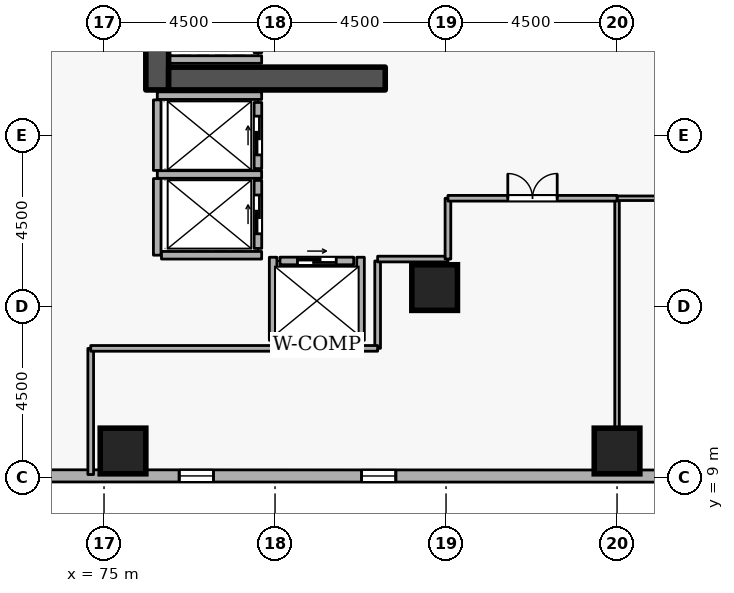
"""IFC4 building model, lengths in metres.
Left out: names, types, materials, properties, quantities, classifications, styles, units other than length and angle.
Written with IfcOpenShell. Run it as: python <this file> out.ifc"""

import sys

from ifc_helpers import new_model, si_unit, direction, frame, frame_2d, origin, origin_2d, place, context, subcontext, project, spatial, rectangle, extrude, element, fill, save


model = new_model("IFC4")
c1 = context("Model", 3, precision=1e-05, world=origin(), true_north=direction((0.0, 1.0)))
c2 = subcontext(c1, "Body", "Model", "MODEL_VIEW")
j1 = project(units=[si_unit("LENGTHUNIT", "METRE"), si_unit("PLANEANGLEUNIT", "RADIAN")], contexts=[c1])
p1 = place(None, origin())
s1 = spatial("IfcSite", under=j1, at=p1, CompositionType="ELEMENT")
p2 = place(p1, origin())
s2 = spatial("IfcBuilding", under=s1, at=p2, CompositionType="ELEMENT")
p3 = place(p2, frame((0.0, 0.0, 80.1)))
s3 = spatial("IfcBuildingStorey", under=s2, at=p3, CompositionType="ELEMENT", Elevation=80.1)
p4 = place(p3, frame((76.4, 19.2, 0.0), z_axis=(0.0, 0.0, 1.0), x_axis=(0.0, 1.0, 0.0)))
e1 = element("IfcWall", 1, at=p4, inside=s3, PredefinedType="SHEAR", context=c2, shape_type="SweptSolid", body=[
    extrude(rectangle(XDim=15.6, YDim=0.6, at=frame_2d((7.8, 0.0))), origin(), (0.0, 0.0, 1.0), 3.6),
])
p5 = place(p3, frame((76.7, 19.5, 0.0), z_axis=(0.0, 0.0, 1.0), x_axis=(1.0, 0.0, 0.0)))
e2 = element("IfcWall", 2, at=p5, inside=s3, PredefinedType="SHEAR", context=c2, shape_type="SweptSolid", body=[
    extrude(rectangle(XDim=5.7, YDim=0.6, at=frame_2d((2.85, 0.0))), origin(), (0.0, 0.0, 1.0), 3.6),
])
for number, where, z_axis, x_axis in (
    (3, (88.5, 9.7, 0.0), (0.0, 0.0, 1.0), (1.0, 0.0, 0.0)),
    (4, (75.5, 9.7, 0.0), (0.0, 0.0, 1.0), (1.0, 0.0, 0.0)),
    (5, (83.7, 14.0, 0.0), (0.0, 0.0, 1.0), (1.0, 0.0, 0.0)),
):
    element("IfcColumn", number, at=place(p3, frame(where, z_axis=z_axis, x_axis=x_axis)), inside=s3, PredefinedType="COLUMN", context=c2, shape_type="SweptSolid", body=[
        extrude(rectangle(XDim=1.2, YDim=1.2, at=origin_2d()), origin(), (0.0, 0.0, 1.0), 3.6),
    ])
p6 = place(p3, frame((70.378, 9.046, 0.0), z_axis=(0.0, 0.0, 1.0), x_axis=(0.999999950907, -0.000313347115, 0.0)))
e6 = element("IfcWall", 6, at=p6, inside=s3, PredefinedType="STANDARD", context=c2, shape_type="SweptSolid", body=[
    extrude(rectangle(XDim=33.503, YDim=0.32, at=frame_2d((16.751, 0.0))), origin(), (0.0, 0.0, 1.0), 2.7),
])
p7 = place(p6, frame((6.6, 0.0, 0.72)))
e7 = element("IfcOpeningElement", 7, at=p7, cuts=e6, PredefinedType="OPENING", context=c2, shape_type="SweptSolid", body=[
    extrude(rectangle(XDim=0.9, YDim=1.75, at=frame_2d((0.45, 0.875))), frame((0.0, 0.17, 0.0), z_axis=(0.0, -1.0, 0.0), x_axis=(1.0, 0.0, 0.0)), (0.0, 0.0, 1.0), 0.34),
])
p8 = place(p6, frame((11.4, 0.0, 0.72)))
e8 = element("IfcOpeningElement", 8, at=p8, cuts=e6, PredefinedType="OPENING", context=c2, shape_type="SweptSolid", body=[
    extrude(rectangle(XDim=0.9, YDim=1.75, at=frame_2d((0.45, 0.875))), frame((0.0, 0.17, 0.0), z_axis=(0.0, -1.0, 0.0), x_axis=(1.0, 0.0, 0.0)), (0.0, 0.0, 1.0), 0.34),
])
p9 = place(p6, frame((21.0, 0.0, 0.72)))
e9 = element("IfcOpeningElement", 9, at=p9, cuts=e6, PredefinedType="OPENING", context=c2, shape_type="SweptSolid", body=[
    extrude(rectangle(XDim=0.9, YDim=1.75, at=frame_2d((0.45, 0.875))), frame((0.0, 0.17, 0.0), z_axis=(0.0, -1.0, 0.0), x_axis=(1.0, 0.0, 0.0)), (0.0, 0.0, 1.0), 0.34),
])
p10 = place(p6, frame((25.8, 0.0, 0.72)))
e10 = element("IfcOpeningElement", 10, at=p10, cuts=e6, PredefinedType="OPENING", context=c2, shape_type="SweptSolid", body=[
    extrude(rectangle(XDim=0.9, YDim=1.75, at=frame_2d((0.45, 0.875))), frame((0.0, 0.17, 0.0), z_axis=(0.0, -1.0, 0.0), x_axis=(1.0, 0.0, 0.0)), (0.0, 0.0, 1.0), 0.34),
])
p11 = place(p3, frame((79.05, 20.18, 0.0), z_axis=(0.0, 0.0, 1.0), x_axis=(0.0, 1.0, 0.0)))
e11 = element("IfcWall", 11, at=p11, inside=s3, PredefinedType="STANDARD", context=c2, shape_type="SweptSolid", body=[
    extrude(rectangle(XDim=1.94, YDim=0.2, at=frame_2d((0.97, 0.0))), origin(), (0.0, 0.0, 1.0), 3.34),
])
p12 = place(p3, frame((79.05, 17.13, 0.0), z_axis=(0.0, 0.0, 1.0), x_axis=(0.0, 1.0, 0.0)))
e12 = element("IfcWall", 12, at=p12, inside=s3, PredefinedType="STANDARD", context=c2, shape_type="SweptSolid", body=[
    extrude(rectangle(XDim=1.74, YDim=0.2, at=frame_2d((0.87, 0.0))), origin(), (0.0, 0.0, 1.0), 3.34),
])
p13 = place(p12, frame((0.36, 0.0, 0.0)))
e13 = element("IfcOpeningElement", 13, at=p13, cuts=e12, PredefinedType="OPENING", context=c2, shape_type="SweptSolid", body=[
    extrude(rectangle(XDim=1.02, YDim=2.06, at=frame_2d((0.51, 1.03))), frame((0.0, 0.11, 0.0), z_axis=(0.0, -1.0, 0.0), x_axis=(1.0, 0.0, 0.0)), (0.0, 0.0, 1.0), 0.22),
])
p14 = place(p3, frame((79.05, 15.03, 0.0), z_axis=(0.0, 0.0, 1.0), x_axis=(0.0, 1.0, 0.0)))
e14 = element("IfcWall", 14, at=p14, inside=s3, PredefinedType="STANDARD", context=c2, shape_type="SweptSolid", body=[
    extrude(rectangle(XDim=1.79, YDim=0.2, at=frame_2d((0.895, 0.0))), origin(), (0.0, 0.0, 1.0), 3.34),
])
p15 = place(p14, frame((0.385, 0.0, 0.0)))
e15 = element("IfcOpeningElement", 15, at=p15, cuts=e14, PredefinedType="OPENING", context=c2, shape_type="SweptSolid", body=[
    extrude(rectangle(XDim=1.02, YDim=2.06, at=frame_2d((0.51, 1.03))), frame((0.0, 0.11, 0.0), z_axis=(0.0, -1.0, 0.0), x_axis=(1.0, 0.0, 0.0)), (0.0, 0.0, 1.0), 0.22),
])
p16 = place(p3, frame((79.63, 14.7, 0.0), z_axis=(0.0, 0.0, 1.0), x_axis=(1.0, 0.0, 0.0)))
e16 = element("IfcWall", 16, at=p16, inside=s3, PredefinedType="STANDARD", context=c2, shape_type="SweptSolid", body=[
    extrude(rectangle(XDim=1.94, YDim=0.2, at=frame_2d((0.97, 0.0))), origin(), (0.0, 0.0, 1.0), 3.34),
])
p17 = place(p16, frame((0.46, 0.0, 0.0)))
e17 = element("IfcOpeningElement", 17, at=p17, cuts=e16, PredefinedType="OPENING", context=c2, shape_type="SweptSolid", body=[
    extrude(rectangle(XDim=1.02, YDim=2.06, at=frame_2d((0.51, 1.03))), frame((0.0, 0.11, 0.0), z_axis=(0.0, -1.0, 0.0), x_axis=(1.0, 0.0, 0.0)), (0.0, 0.0, 1.0), 0.22),
])
p18 = place(p3, frame((76.712, 20.0, 0.0), z_axis=(0.0, 0.0, 1.0), x_axis=(1.0, 0.0, 0.0)))
e18 = element("IfcWall", 18, at=p18, inside=s3, PredefinedType="STANDARD", context=c2, shape_type="SweptSolid", body=[
    extrude(rectangle(XDim=2.436, YDim=0.2, at=frame_2d((1.218, 0.0))), origin(), (0.0, 0.0, 1.0), 3.34),
])
p19 = place(p3, frame((76.402, 19.05, 0.0), z_axis=(0.0, 0.0, 1.0), x_axis=(1.0, 0.0, 0.0)))
e19 = element("IfcWall", 19, at=p19, inside=s3, PredefinedType="STANDARD", context=c2, shape_type="SweptSolid", body=[
    extrude(rectangle(XDim=2.746, YDim=0.2, at=frame_2d((1.373, 0.0))), origin(), (0.0, 0.0, 1.0), 2.545),
])
p20 = place(p3, frame((76.402, 16.975, 0.0), z_axis=(0.0, 0.0, 1.0), x_axis=(1.0, 0.0, 0.0)))
e20 = element("IfcWall", 20, at=p20, inside=s3, PredefinedType="STANDARD", context=c2, shape_type="SweptSolid", body=[
    extrude(rectangle(XDim=2.746, YDim=0.2, at=frame_2d((1.373, 0.0))), origin(), (0.0, 0.0, 1.0), 3.34),
])
p21 = place(p3, frame((76.4, 14.852, 0.0), z_axis=(0.0, 0.0, 1.0), x_axis=(0.0, 1.0, 0.0)))
e21 = element("IfcWall", 21, at=p21, inside=s3, PredefinedType="STANDARD", context=c2, shape_type="SweptSolid", body=[
    extrude(rectangle(XDim=2.016, YDim=0.2, at=frame_2d((1.008, 0.0))), origin(), (0.0, 0.0, 1.0), 3.34),
])
p22 = place(p3, frame((76.4, 17.082, 0.0), z_axis=(0.0, 0.0, 1.0), x_axis=(0.0, 1.0, 0.0)))
e22 = element("IfcWall", 22, at=p22, inside=s3, PredefinedType="STANDARD", context=c2, shape_type="SweptSolid", body=[
    extrude(rectangle(XDim=1.856, YDim=0.2, at=frame_2d((0.928, 0.0))), origin(), (0.0, 0.0, 1.0), 3.34),
])
p23 = place(p3, frame((76.512, 14.85, 0.0), z_axis=(0.0, 0.0, 1.0), x_axis=(1.0, 0.0, 0.0)))
e23 = element("IfcWall", 23, at=p23, inside=s3, PredefinedType="STANDARD", context=c2, shape_type="SweptSolid", body=[
    extrude(rectangle(XDim=2.636, YDim=0.2, at=frame_2d((1.318, 0.0))), origin(), (0.0, 0.0, 1.0), 3.34),
])
p24 = place(p3, frame((79.452, 12.5, 0.0), z_axis=(0.0, 0.0, 1.0), x_axis=(1.0, 0.0, 0.0)))
e24 = element("IfcWall", 24, at=p24, inside=s3, PredefinedType="STANDARD", context=c2, shape_type="SweptSolid", body=[
    extrude(rectangle(XDim=2.296, YDim=0.2, at=frame_2d((1.148, 0.0))), origin(), (0.0, 0.0, 1.0), 3.34),
])
for number, where, z_axis, x_axis in (
    (25, (81.75, 12.612, 0.0), (0.0, 0.0, 1.0), (0.0, 1.0, 0.0)),
    (26, (79.45, 12.612, 0.0), (0.0, 0.0, 1.0), (0.0, 1.0, 0.0)),
):
    element("IfcWall", number, at=place(p3, frame(where, z_axis=z_axis, x_axis=x_axis)), inside=s3, PredefinedType="STANDARD", context=c2, shape_type="SweptSolid", body=[
        extrude(rectangle(XDim=2.186, YDim=0.2, at=frame_2d((1.093, 0.0))), origin(), (0.0, 0.0, 1.0), 3.34),
    ])
p25 = place(p3, frame((88.5, 9.08, 0.0), z_axis=(0.0, 0.0, 1.0), x_axis=(0.0, 1.0, 0.0)))
e27 = element("IfcWall", 27, at=p25, inside=s3, PredefinedType="PARTITIONING", context=c2, shape_type="SweptSolid", body=[
    extrude(rectangle(XDim=7.27, YDim=0.12, at=frame_2d((3.635, 0.0))), origin(), (0.0, 0.0, 1.0), 2.882),
])
p26 = place(p3, frame((88.5, 16.35, 0.0), z_axis=(0.0, 0.0, 1.0), x_axis=(1.0, 0.0, 0.0)))
e28 = element("IfcWall", 28, at=p26, inside=s3, PredefinedType="PARTITIONING", context=c2, shape_type="SweptSolid", body=[
    extrude(rectangle(XDim=4.45, YDim=0.12, at=frame_2d((2.225, 0.0))), origin(), (0.0, 0.0, 1.0), 3.34),
])
p27 = place(p26, frame((1.7, 0.0, 0.0)))
e29 = element("IfcOpeningElement", 29, at=p27, cuts=e28, PredefinedType="OPENING", context=c2, shape_type="SweptSolid", body=[
    extrude(rectangle(XDim=1.05, YDim=2.1, at=frame_2d((0.525, 1.05))), frame((0.0, 0.07, 0.0), z_axis=(0.0, -1.0, 0.0), x_axis=(1.0, 0.0, 0.0)), (0.0, 0.0, 1.0), 0.14),
])
p28 = place(p3, frame((82.2, 12.4, 0.0), z_axis=(0.0, 0.0, 1.0), x_axis=(0.0, 1.0, 0.0)))
e30 = element("IfcWall", 30, at=p28, inside=s3, PredefinedType="PARTITIONING", context=c2, shape_type="SweptSolid", body=[
    extrude(rectangle(XDim=2.3, YDim=0.15, at=frame_2d((1.15, 0.0))), origin(), (0.0, 0.0, 1.0), 3.34),
])
p29 = place(p3, frame((82.2, 14.75, 0.0), z_axis=(0.0, 0.0, 1.0), x_axis=(1.0, 0.0, 0.0)))
e31 = element("IfcWall", 31, at=p29, inside=s3, PredefinedType="PARTITIONING", context=c2, shape_type="SweptSolid", body=[
    extrude(rectangle(XDim=1.85, YDim=0.15, at=frame_2d((0.925, 0.0))), origin(), (0.0, 0.0, 1.0), 3.34),
])
p30 = place(p3, frame((84.05, 14.75, 0.0), z_axis=(0.0, 0.0, 1.0), x_axis=(0.0, 1.0, 0.0)))
e32 = element("IfcWall", 32, at=p30, inside=s3, PredefinedType="PARTITIONING", context=c2, shape_type="SweptSolid", body=[
    extrude(rectangle(XDim=1.6, YDim=0.15, at=frame_2d((0.8, 0.0))), origin(), (0.0, 0.0, 1.0), 3.34),
])
p31 = place(p3, frame((84.05, 16.35, 0.0), z_axis=(0.0, 0.0, 1.0), x_axis=(1.0, 0.0, 0.0)))
e33 = element("IfcWall", 33, at=p31, inside=s3, PredefinedType="PARTITIONING", context=c2, shape_type="SweptSolid", body=[
    extrude(rectangle(XDim=4.45, YDim=0.15, at=frame_2d((2.225, 0.0))), origin(), (0.0, 0.0, 1.0), 3.34),
])
p32 = place(p31, frame((1.575, 0.0, 0.0)))
e34 = element("IfcOpeningElement", 34, at=p32, cuts=e33, PredefinedType="OPENING", context=c2, shape_type="SweptSolid", body=[
    extrude(rectangle(XDim=1.3, YDim=2.12, at=frame_2d((0.65, 1.06))), frame((0.0, 0.085, 0.0), z_axis=(0.0, -1.0, 0.0), x_axis=(1.0, 0.0, 0.0)), (0.0, 0.0, 1.0), 0.17),
])
p33 = place(p3, frame((74.65, 9.08, 0.0), z_axis=(0.0, 0.0, 1.0), x_axis=(0.0, 1.0, 0.0)))
e35 = element("IfcWall", 35, at=p33, inside=s3, PredefinedType="PARTITIONING", context=c2, shape_type="SweptSolid", body=[
    extrude(rectangle(XDim=3.32, YDim=0.15, at=frame_2d((1.66, 0.0))), origin(), (0.0, 0.0, 1.0), 3.34),
])
p34 = place(p3, frame((74.65, 12.4, 0.0), z_axis=(0.0, 0.0, 1.0), x_axis=(1.0, 0.0, 0.0)))
e36 = element("IfcWall", 36, at=p34, inside=s3, PredefinedType="PARTITIONING", context=c2, shape_type="SweptSolid", body=[
    extrude(rectangle(XDim=4.802, YDim=0.15, at=frame_2d((2.401, 0.0))), origin(), (0.0, 0.0, 1.0), 3.34),
])
p35 = place(p3, frame((81.748, 12.4, 0.0), z_axis=(0.0, 0.0, 1.0), x_axis=(1.0, 0.0, 0.0)))
e37 = element("IfcWall", 37, at=p35, inside=s3, PredefinedType="PARTITIONING", context=c2, shape_type="SweptSolid", body=[
    extrude(rectangle(XDim=0.452, YDim=0.15, at=frame_2d((0.226, 0.0))), origin(), (0.0, 0.0, 1.0), 3.34),
])
p36 = place(p7, origin())
e38 = element("IfcWindow", 38, at=p36, inside=s3, PartitioningType="SINGLE_PANEL", PredefinedType="WINDOW", context=c2, shape_type="SweptSolid", body=[
    extrude(rectangle(XDim=0.9, YDim=1.75, at=frame_2d((0.45, 0.875))), frame((0.0, 0.03, 0.0), z_axis=(0.0, -1.0, 0.0), x_axis=(1.0, 0.0, 0.0)), (0.0, 0.0, 1.0), 0.06),
])
fill(e7, e38)
p37 = place(p8, origin())
e39 = element("IfcWindow", 39, at=p37, inside=s3, PartitioningType="SINGLE_PANEL", PredefinedType="WINDOW", context=c2, shape_type="SweptSolid", body=[
    extrude(rectangle(XDim=0.9, YDim=1.75, at=frame_2d((0.45, 0.875))), frame((0.0, 0.03, 0.0), z_axis=(0.0, -1.0, 0.0), x_axis=(1.0, 0.0, 0.0)), (0.0, 0.0, 1.0), 0.06),
])
fill(e8, e39)
p38 = place(p13, origin())
e40 = element("IfcDoor", 40, at=p38, inside=s3, OperationType="SLIDING_TO_LEFT", PredefinedType="DOOR", context=c2, shape_type="SweptSolid", body=[
    extrude(rectangle(XDim=1.02, YDim=2.06, at=frame_2d((0.51, 1.03))), frame((0.0, 0.025, 0.0), z_axis=(0.0, -1.0, 0.0), x_axis=(1.0, 0.0, 0.0)), (0.0, 0.0, 1.0), 0.05),
])
fill(e13, e40)
p39 = place(p15, origin())
e41 = element("IfcDoor", 41, at=p39, inside=s3, OperationType="SLIDING_TO_LEFT", PredefinedType="DOOR", context=c2, shape_type="SweptSolid", body=[
    extrude(rectangle(XDim=1.02, YDim=2.06, at=frame_2d((0.51, 1.03))), frame((0.0, 0.025, 0.0), z_axis=(0.0, -1.0, 0.0), x_axis=(1.0, 0.0, 0.0)), (0.0, 0.0, 1.0), 0.05),
])
fill(e15, e41)
p40 = place(p17, origin())
e42 = element("IfcDoor", 42, at=p40, inside=s3, OperationType="SLIDING_TO_LEFT", PredefinedType="DOOR", context=c2, shape_type="SweptSolid", body=[
    extrude(rectangle(XDim=1.02, YDim=2.06, at=frame_2d((0.51, 1.03))), frame((0.0, 0.025, 0.0), z_axis=(0.0, -1.0, 0.0), x_axis=(1.0, 0.0, 0.0)), (0.0, 0.0, 1.0), 0.05),
])
fill(e17, e42)
p41 = place(p32, origin())
e43 = element("IfcDoor", 43, at=p41, inside=s3, OperationType="DOUBLE_DOOR_SINGLE_SWING", PredefinedType="DOOR", context=c2, shape_type="SweptSolid", body=[
    extrude(rectangle(XDim=1.3, YDim=2.12, at=frame_2d((0.65, 1.06))), frame((0.0, 0.025, 0.0), z_axis=(0.0, -1.0, 0.0), x_axis=(1.0, 0.0, 0.0)), (0.0, 0.0, 1.0), 0.05),
])
fill(e34, e43)
save(model, sys.argv[1])
